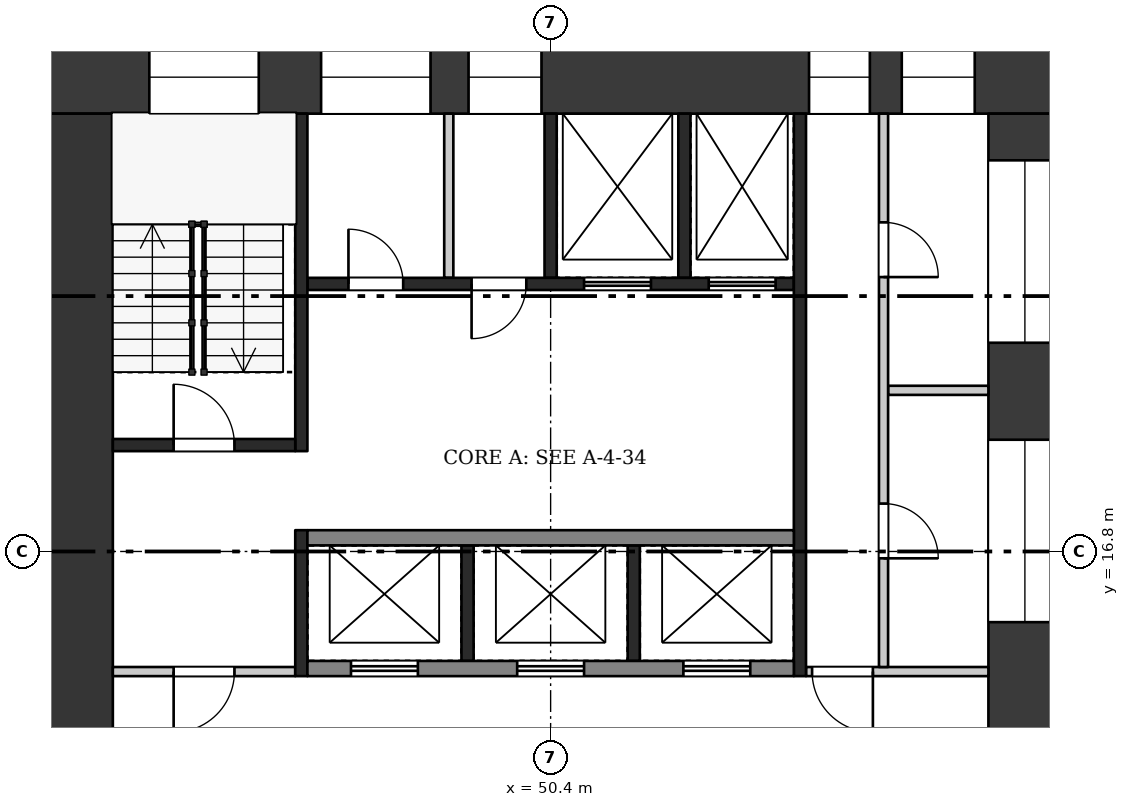
"""IFC4 building model, lengths in metres.
Left out: names, types, materials, properties, quantities, classifications, styles, units other than length and angle.
Written with IfcOpenShell. Run it as: python <this file> out.ifc"""

import sys

from ifc_helpers import new_model, si_unit, direction, frame, frame_2d, origin, place, context, subcontext, project, spatial, rectangle, extrude, element, fill, save


model = new_model("IFC4")
c1 = context("Model", 3, precision=1e-05, world=origin(), true_north=direction((0.0, 1.0)))
c2 = subcontext(c1, "Body", "Model", "MODEL_VIEW")
j1 = project(units=[si_unit("LENGTHUNIT", "METRE"), si_unit("PLANEANGLEUNIT", "RADIAN")], contexts=[c1])
p1 = place(None, origin())
s1 = spatial("IfcSite", under=j1, at=p1, CompositionType="ELEMENT")
p2 = place(p1, origin())
s2 = spatial("IfcBuilding", under=s1, at=p2, CompositionType="ELEMENT")
p3 = place(p2, frame((0.0, 0.0, 256.2)))
s3 = spatial("IfcBuildingStorey", under=s2, at=p3, CompositionType="ELEMENT", Elevation=256.2)
p4 = place(p3, frame((42.0, 24.6, 0.0), z_axis=(0.0, 0.0, 1.0), x_axis=(1.0, 0.0, 0.0)))
e1 = element("IfcWall", 1, at=p4, inside=s3, PredefinedType="SHEAR", context=c2, shape_type="SweptSolid", body=[
    extrude(rectangle(XDim=16.8, YDim=1.2, at=frame_2d((8.4, 0.0))), origin(), (0.0, 0.0, 1.0), 3.22),
])
p5 = place(p4, frame((1.8, 0.0, 0.5)))
e2 = element("IfcOpeningElement", 2, at=p5, cuts=e1, PredefinedType="OPENING", context=c2, shape_type="SweptSolid", body=[
    extrude(rectangle(XDim=1.8, YDim=2.4, at=frame_2d((0.9, 1.2))), frame((0.0, 0.61, 0.0), z_axis=(0.0, -1.0, 0.0), x_axis=(1.0, 0.0, 0.0)), (0.0, 0.0, 1.0), 1.22),
])
p6 = place(p4, frame((4.625, 0.0, 1.6)))
e3 = element("IfcOpeningElement", 3, at=p6, cuts=e1, PredefinedType="OPENING", context=c2, shape_type="SweptSolid", body=[
    extrude(rectangle(XDim=1.8, YDim=1.2, at=frame_2d((0.9, 0.6))), frame((0.0, 0.61, 0.0), z_axis=(0.0, -1.0, 0.0), x_axis=(1.0, 0.0, 0.0)), (0.0, 0.0, 1.0), 1.22),
])
p7 = place(p4, frame((7.05, 0.0, 1.6)))
e4 = element("IfcOpeningElement", 4, at=p7, cuts=e1, PredefinedType="OPENING", context=c2, shape_type="SweptSolid", body=[
    extrude(rectangle(XDim=1.2, YDim=1.2, at=frame_2d((0.6, 0.6))), frame((0.0, 0.61, 0.0), z_axis=(0.0, -1.0, 0.0), x_axis=(1.0, 0.0, 0.0)), (0.0, 0.0, 1.0), 1.22),
])
p8 = place(p4, frame((12.65, 0.0, 0.6)))
e5 = element("IfcOpeningElement", 5, at=p8, cuts=e1, PredefinedType="OPENING", context=c2, shape_type="SweptSolid", body=[
    extrude(rectangle(XDim=1.0, YDim=2.1, at=frame_2d((0.5, 1.05))), frame((0.0, 0.61, 0.0), z_axis=(0.0, -1.0, 0.0), x_axis=(1.0, 0.0, 0.0)), (0.0, 0.0, 1.0), 1.22),
])
p9 = place(p4, frame((14.175, 0.0, 1.6)))
e6 = element("IfcOpeningElement", 6, at=p9, cuts=e1, PredefinedType="OPENING", context=c2, shape_type="SweptSolid", body=[
    extrude(rectangle(XDim=1.2, YDim=1.2, at=frame_2d((0.6, 0.6))), frame((0.0, 0.61, 0.0), z_axis=(0.0, -1.0, 0.0), x_axis=(1.0, 0.0, 0.0)), (0.0, 0.0, 1.0), 1.22),
])
p10 = place(p3, frame((42.6, 9.6, 0.0), z_axis=(0.0, 0.0, 1.0), x_axis=(0.0, 1.0, 0.0)))
e7 = element("IfcWall", 7, at=p10, inside=s3, PredefinedType="SHEAR", context=c2, shape_type="SweptSolid", body=[
    extrude(rectangle(XDim=14.4, YDim=1.2, at=frame_2d((7.2, 0.0))), origin(), (0.0, 0.0, 1.0), 3.22),
])
p11 = place(p10, frame((2.1, 0.0, 0.0)))
e8 = element("IfcOpeningElement", 8, at=p11, cuts=e7, PredefinedType="OPENING", context=c2, shape_type="SweptSolid", body=[
    extrude(rectangle(XDim=1.8, YDim=2.1, at=frame_2d((0.9, 1.05))), frame((0.0, 0.61, 0.0), z_axis=(0.0, -1.0, 0.0), x_axis=(1.0, 0.0, 0.0)), (0.0, 0.0, 1.0), 1.22),
])
p12 = place(p3, frame((58.2, 9.6, 0.0), z_axis=(0.0, 0.0, 1.0), x_axis=(0.0, 1.0, 0.0)))
e9 = element("IfcWall", 9, at=p12, inside=s3, PredefinedType="SHEAR", context=c2, shape_type="SweptSolid", body=[
    extrude(rectangle(XDim=14.4, YDim=1.2, at=frame_2d((7.2, 0.0))), origin(), (0.0, 0.0, 1.0), 3.22),
])
p13 = place(p12, frame((1.105, 0.0, 0.6)))
e10 = element("IfcOpeningElement", 10, at=p13, cuts=e9, PredefinedType="OPENING", context=c2, shape_type="SweptSolid", body=[
    extrude(rectangle(XDim=3.0, YDim=2.1, at=frame_2d((1.5, 1.05))), frame((0.0, 0.61, 0.0), z_axis=(0.0, -1.0, 0.0), x_axis=(1.0, 0.0, 0.0)), (0.0, 0.0, 1.0), 1.22),
])
p14 = place(p12, frame((6.038, 0.0, 1.6)))
e11 = element("IfcOpeningElement", 11, at=p14, cuts=e9, PredefinedType="OPENING", context=c2, shape_type="SweptSolid", body=[
    extrude(rectangle(XDim=3.0, YDim=1.2, at=frame_2d((1.5, 0.6))), frame((0.0, 0.61, 0.0), z_axis=(0.0, -1.0, 0.0), x_axis=(1.0, 0.0, 0.0)), (0.0, 0.0, 1.0), 1.22),
])
p15 = place(p12, frame((10.633, 0.0, 1.6)))
e12 = element("IfcOpeningElement", 12, at=p15, cuts=e9, PredefinedType="OPENING", context=c2, shape_type="SweptSolid", body=[
    extrude(rectangle(XDim=3.0, YDim=1.2, at=frame_2d((1.5, 0.6))), frame((0.0, 0.61, 0.0), z_axis=(0.0, -1.0, 0.0), x_axis=(1.0, 0.0, 0.0)), (0.0, 0.0, 1.0), 1.22),
])
for number, where, z_axis, x_axis in (
    (13, (49.033, 15.0, 0.0), (0.0, 0.0, 1.0), (0.0, 1.0, 0.0)),
    (14, (51.767, 15.0, 0.0), (0.0, 0.0, 1.0), (0.0, 1.0, 0.0)),
):
    element("IfcWall", number, at=place(p3, frame(where, z_axis=z_axis, x_axis=x_axis)), inside=s3, PredefinedType="SHEAR", context=c2, shape_type="SweptSolid", body=[
        extrude(rectangle(XDim=1.9, YDim=0.2, at=frame_2d((0.95, 0.0))), origin(), (0.0, 0.0, 1.0), 3.22),
    ])
p16 = place(p3, frame((46.4, 14.875, 0.0), z_axis=(0.0, 0.0, 1.0), x_axis=(1.0, 0.0, 0.0)))
e15 = element("IfcWall", 15, at=p16, inside=s3, PredefinedType="SHEAR", context=c2, shape_type="SweptSolid", body=[
    extrude(rectangle(XDim=8.0, YDim=0.25, at=frame_2d((4.0, 0.0))), origin(), (0.0, 0.0, 1.0), 3.22),
])
p17 = place(p16, frame((0.717, 0.0, 0.0)))
e16 = element("IfcOpeningElement", 16, at=p17, cuts=e15, PredefinedType="OPENING", context=c2, shape_type="SweptSolid", body=[
    extrude(rectangle(XDim=1.1, YDim=2.1, at=frame_2d((0.55, 1.05))), frame((0.0, 0.135, 0.0), z_axis=(0.0, -1.0, 0.0), x_axis=(1.0, 0.0, 0.0)), (0.0, 0.0, 1.0), 0.27),
])
p18 = place(p16, frame((3.45, 0.0, 0.0)))
e17 = element("IfcOpeningElement", 17, at=p18, cuts=e15, PredefinedType="OPENING", context=c2, shape_type="SweptSolid", body=[
    extrude(rectangle(XDim=1.1, YDim=2.1, at=frame_2d((0.55, 1.05))), frame((0.0, 0.135, 0.0), z_axis=(0.0, -1.0, 0.0), x_axis=(1.0, 0.0, 0.0)), (0.0, 0.0, 1.0), 0.27),
])
p19 = place(p16, frame((6.183, 0.0, 0.0)))
e18 = element("IfcOpeningElement", 18, at=p19, cuts=e15, PredefinedType="OPENING", context=c2, shape_type="SweptSolid", body=[
    extrude(rectangle(XDim=1.1, YDim=2.1, at=frame_2d((0.55, 1.05))), frame((0.0, 0.135, 0.0), z_axis=(0.0, -1.0, 0.0), x_axis=(1.0, 0.0, 0.0)), (0.0, 0.0, 1.0), 0.27),
])
p20 = place(p3, frame((46.4, 17.025, 0.0), z_axis=(0.0, 0.0, 1.0), x_axis=(1.0, 0.0, 0.0)))
e19 = element("IfcWall", 19, at=p20, inside=s3, PredefinedType="SHEAR", context=c2, shape_type="SweptSolid", body=[
    extrude(rectangle(XDim=8.0, YDim=0.25, at=frame_2d((4.0, 0.0))), origin(), (0.0, 0.0, 1.0), 3.22),
])
for number, where, z_axis, x_axis in (
    (20, (50.4, 21.3, 0.0), (0.0, 0.0, 1.0), (0.0, 1.0, 0.0)),
    (21, (52.6, 21.3, 0.0), (0.0, 0.0, 1.0), (0.0, 1.0, 0.0)),
):
    element("IfcWall", number, at=place(p3, frame(where, z_axis=z_axis, x_axis=x_axis)), inside=s3, PredefinedType="SHEAR", context=c2, shape_type="SweptSolid", body=[
        extrude(rectangle(XDim=2.7, YDim=0.2, at=frame_2d((1.35, 0.0))), origin(), (0.0, 0.0, 1.0), 3.22),
    ])
p21 = place(p3, frame((48.725, 21.3, 0.0), z_axis=(0.0, 0.0, 1.0), x_axis=(0.0, 1.0, 0.0)))
e22 = element("IfcWall", 22, at=p21, inside=s3, PredefinedType="PARTITIONING", context=c2, shape_type="SweptSolid", body=[
    extrude(rectangle(XDim=2.7, YDim=0.15, at=frame_2d((1.35, 0.0))), origin(), (0.0, 0.0, 1.0), 3.22),
])
p22 = place(p3, frame((46.4, 21.2, 0.0), z_axis=(0.0, 0.0, 1.0), x_axis=(1.0, 0.0, 0.0)))
e23 = element("IfcWall", 23, at=p22, inside=s3, PredefinedType="SHEAR", context=c2, shape_type="SweptSolid", body=[
    extrude(rectangle(XDim=8.0, YDim=0.2, at=frame_2d((4.0, 0.0))), origin(), (0.0, 0.0, 1.0), 3.22),
])
p23 = place(p22, frame((0.675, 0.0, 0.0)))
e24 = element("IfcOpeningElement", 24, at=p23, cuts=e23, PredefinedType="OPENING", context=c2, shape_type="SweptSolid", body=[
    extrude(rectangle(XDim=0.9, YDim=2.1, at=frame_2d((0.45, 1.05))), frame((0.0, 0.11, 0.0), z_axis=(0.0, -1.0, 0.0), x_axis=(1.0, 0.0, 0.0)), (0.0, 0.0, 1.0), 0.22),
])
p24 = place(p22, frame((2.7, 0.0, 0.0)))
e25 = element("IfcOpeningElement", 25, at=p24, cuts=e23, PredefinedType="OPENING", context=c2, shape_type="SweptSolid", body=[
    extrude(rectangle(XDim=0.9, YDim=2.1, at=frame_2d((0.45, 1.05))), frame((0.0, 0.11, 0.0), z_axis=(0.0, -1.0, 0.0), x_axis=(1.0, 0.0, 0.0)), (0.0, 0.0, 1.0), 0.22),
])
p25 = place(p22, frame((4.55, 0.0, 0.0)))
e26 = element("IfcOpeningElement", 26, at=p25, cuts=e23, PredefinedType="OPENING", context=c2, shape_type="SweptSolid", body=[
    extrude(rectangle(XDim=1.1, YDim=2.1, at=frame_2d((0.55, 1.05))), frame((0.0, 0.11, 0.0), z_axis=(0.0, -1.0, 0.0), x_axis=(1.0, 0.0, 0.0)), (0.0, 0.0, 1.0), 0.22),
])
p26 = place(p22, frame((6.6, 0.0, 0.0)))
e27 = element("IfcOpeningElement", 27, at=p26, cuts=e23, PredefinedType="OPENING", context=c2, shape_type="SweptSolid", body=[
    extrude(rectangle(XDim=1.1, YDim=2.1, at=frame_2d((0.55, 1.05))), frame((0.0, 0.11, 0.0), z_axis=(0.0, -1.0, 0.0), x_axis=(1.0, 0.0, 0.0)), (0.0, 0.0, 1.0), 0.22),
])
p27 = place(p3, frame((46.3, 14.75, 0.0), z_axis=(0.0, 0.0, 1.0), x_axis=(0.0, 1.0, 0.0)))
e28 = element("IfcWall", 28, at=p27, inside=s3, PredefinedType="SHEAR", context=c2, shape_type="SweptSolid", body=[
    extrude(rectangle(XDim=2.4, YDim=0.2, at=frame_2d((1.2, 0.0))), origin(), (0.0, 0.0, 1.0), 3.22),
])
p28 = place(p3, frame((46.3, 18.45, 0.0), z_axis=(0.0, 0.0, 1.0), x_axis=(0.0, 1.0, 0.0)))
e29 = element("IfcWall", 29, at=p28, inside=s3, PredefinedType="SHEAR", context=c2, shape_type="SweptSolid", body=[
    extrude(rectangle(XDim=5.55, YDim=0.2, at=frame_2d((2.775, 0.0))), origin(), (0.0, 0.0, 1.0), 3.22),
])
p29 = place(p3, frame((43.2, 14.825, 0.0), z_axis=(0.0, 0.0, 1.0), x_axis=(1.0, 0.0, 0.0)))
e30 = element("IfcWall", 30, at=p29, inside=s3, PredefinedType="PARTITIONING", context=c2, shape_type="SweptSolid", body=[
    extrude(rectangle(XDim=3.0, YDim=0.15, at=frame_2d((1.5, 0.0))), origin(), (0.0, 0.0, 1.0), 3.22),
])
p30 = place(p29, frame((1.0, 0.0, 0.0)))
e31 = element("IfcOpeningElement", 31, at=p30, cuts=e30, PredefinedType="OPENING", context=c2, shape_type="SweptSolid", body=[
    extrude(rectangle(XDim=1.0, YDim=2.1, at=frame_2d((0.5, 1.05))), frame((0.0, 0.085, 0.0), z_axis=(0.0, -1.0, 0.0), x_axis=(1.0, 0.0, 0.0)), (0.0, 0.0, 1.0), 0.17),
])
p31 = place(p3, frame((43.2, 18.55, 0.0), z_axis=(0.0, 0.0, 1.0), x_axis=(1.0, 0.0, 0.0)))
e32 = element("IfcWall", 32, at=p31, inside=s3, PredefinedType="SHEAR", context=c2, shape_type="SweptSolid", body=[
    extrude(rectangle(XDim=3.0, YDim=0.2, at=frame_2d((1.5, 0.0))), origin(), (0.0, 0.0, 1.0), 3.22),
])
p32 = place(p31, frame((1.0, 0.0, 0.0)))
e33 = element("IfcOpeningElement", 33, at=p32, cuts=e32, PredefinedType="OPENING", context=c2, shape_type="SweptSolid", body=[
    extrude(rectangle(XDim=1.0, YDim=2.1, at=frame_2d((0.5, 1.05))), frame((0.0, 0.11, 0.0), z_axis=(0.0, -1.0, 0.0), x_axis=(1.0, 0.0, 0.0)), (0.0, 0.0, 1.0), 0.22),
])
p33 = place(p3, frame((54.5, 14.75, 0.0), z_axis=(0.0, 0.0, 1.0), x_axis=(0.0, 1.0, 0.0)))
e34 = element("IfcWall", 34, at=p33, inside=s3, PredefinedType="SHEAR", context=c2, shape_type="SweptSolid", body=[
    extrude(rectangle(XDim=9.25, YDim=0.2, at=frame_2d((4.625, 0.0))), origin(), (0.0, 0.0, 1.0), 3.22),
])
p34 = place(p3, frame((54.6, 14.825, 0.0), z_axis=(0.0, 0.0, 1.0), x_axis=(1.0, 0.0, 0.0)))
e35 = element("IfcWall", 35, at=p34, inside=s3, PredefinedType="PARTITIONING", context=c2, shape_type="SweptSolid", body=[
    extrude(rectangle(XDim=3.0, YDim=0.15, at=frame_2d((1.5, 0.0))), origin(), (0.0, 0.0, 1.0), 3.22),
])
p35 = place(p34, frame((0.1, 0.0, 0.0)))
e36 = element("IfcOpeningElement", 36, at=p35, cuts=e35, PredefinedType="OPENING", context=c2, shape_type="SweptSolid", body=[
    extrude(rectangle(XDim=1.0, YDim=2.1, at=frame_2d((0.5, 1.05))), frame((0.0, 0.085, 0.0), z_axis=(0.0, -1.0, 0.0), x_axis=(1.0, 0.0, 0.0)), (0.0, 0.0, 1.0), 0.17),
])
p36 = place(p3, frame((55.95, 19.45, 0.0), z_axis=(0.0, 0.0, 1.0), x_axis=(1.0, 0.0, 0.0)))
e37 = element("IfcWall", 37, at=p36, inside=s3, PredefinedType="PARTITIONING", context=c2, shape_type="SweptSolid", body=[
    extrude(rectangle(XDim=1.65, YDim=0.15, at=frame_2d((0.825, 0.0))), origin(), (0.0, 0.0, 1.0), 3.22),
])
p37 = place(p3, frame((55.875, 14.9, 0.0), z_axis=(0.0, 0.0, 1.0), x_axis=(0.0, 1.0, 0.0)))
e38 = element("IfcWall", 38, at=p37, inside=s3, PredefinedType="PARTITIONING", context=c2, shape_type="SweptSolid", body=[
    extrude(rectangle(XDim=9.1, YDim=0.15, at=frame_2d((4.55, 0.0))), origin(), (0.0, 0.0, 1.0), 3.22),
])
p38 = place(p37, frame((1.788, 0.0, 0.0)))
e39 = element("IfcOpeningElement", 39, at=p38, cuts=e38, PredefinedType="OPENING", context=c2, shape_type="SweptSolid", body=[
    extrude(rectangle(XDim=0.9, YDim=2.1, at=frame_2d((0.45, 1.05))), frame((0.0, 0.085, 0.0), z_axis=(0.0, -1.0, 0.0), x_axis=(1.0, 0.0, 0.0)), (0.0, 0.0, 1.0), 0.17),
])
p39 = place(p37, frame((6.413, 0.0, 0.0)))
e40 = element("IfcOpeningElement", 40, at=p39, cuts=e38, PredefinedType="OPENING", context=c2, shape_type="SweptSolid", body=[
    extrude(rectangle(XDim=0.9, YDim=2.1, at=frame_2d((0.45, 1.05))), frame((0.0, 0.085, 0.0), z_axis=(0.0, -1.0, 0.0), x_axis=(1.0, 0.0, 0.0)), (0.0, 0.0, 1.0), 0.17),
])
p40 = place(p17, origin())
e41 = element("IfcDoor", 41, at=p40, inside=s3, OperationType="DOUBLE_DOOR_SLIDING", PredefinedType="DOOR", context=c2, shape_type="SweptSolid", body=[
    extrude(rectangle(XDim=1.1, YDim=2.1, at=frame_2d((0.55, 1.05))), frame((0.0, 0.025, 0.0), z_axis=(0.0, -1.0, 0.0), x_axis=(1.0, 0.0, 0.0)), (0.0, 0.0, 1.0), 0.05),
])
fill(e16, e41)
p41 = place(p18, origin())
e42 = element("IfcDoor", 42, at=p41, inside=s3, OperationType="DOUBLE_DOOR_SLIDING", PredefinedType="DOOR", context=c2, shape_type="SweptSolid", body=[
    extrude(rectangle(XDim=1.1, YDim=2.1, at=frame_2d((0.55, 1.05))), frame((0.0, 0.025, 0.0), z_axis=(0.0, -1.0, 0.0), x_axis=(1.0, 0.0, 0.0)), (0.0, 0.0, 1.0), 0.05),
])
fill(e17, e42)
p42 = place(p19, origin())
e43 = element("IfcDoor", 43, at=p42, inside=s3, OperationType="DOUBLE_DOOR_SLIDING", PredefinedType="DOOR", context=c2, shape_type="SweptSolid", body=[
    extrude(rectangle(XDim=1.1, YDim=2.1, at=frame_2d((0.55, 1.05))), frame((0.0, 0.025, 0.0), z_axis=(0.0, -1.0, 0.0), x_axis=(1.0, 0.0, 0.0)), (0.0, 0.0, 1.0), 0.05),
])
fill(e18, e43)
p43 = place(p23, origin())
e44 = element("IfcDoor", 44, at=p43, inside=s3, OperationType="SINGLE_SWING_LEFT", PredefinedType="DOOR", context=c2, shape_type="SweptSolid", body=[
    extrude(rectangle(XDim=0.9, YDim=2.1, at=frame_2d((0.45, 1.05))), frame((0.0, 0.025, 0.0), z_axis=(0.0, -1.0, 0.0), x_axis=(1.0, 0.0, 0.0)), (0.0, 0.0, 1.0), 0.05),
])
fill(e24, e44)
p44 = place(p24, frame((0.9, 0.0, 0.0), z_axis=(0.0, 0.0, 1.0), x_axis=(-1.0, 0.0, 0.0)))
e45 = element("IfcDoor", 45, at=p44, inside=s3, OperationType="SINGLE_SWING_RIGHT", PredefinedType="DOOR", context=c2, shape_type="SweptSolid", body=[
    extrude(rectangle(XDim=0.9, YDim=2.1, at=frame_2d((0.45, 1.05))), frame((0.0, 0.025, 0.0), z_axis=(0.0, -1.0, 0.0), x_axis=(1.0, 0.0, 0.0)), (0.0, 0.0, 1.0), 0.05),
])
fill(e25, e45)
p45 = place(p25, origin())
e46 = element("IfcDoor", 46, at=p45, inside=s3, OperationType="DOUBLE_DOOR_SLIDING", PredefinedType="DOOR", context=c2, shape_type="SweptSolid", body=[
    extrude(rectangle(XDim=1.1, YDim=2.1, at=frame_2d((0.55, 1.05))), frame((0.0, 0.025, 0.0), z_axis=(0.0, -1.0, 0.0), x_axis=(1.0, 0.0, 0.0)), (0.0, 0.0, 1.0), 0.05),
])
fill(e26, e46)
p46 = place(p26, origin())
e47 = element("IfcDoor", 47, at=p46, inside=s3, OperationType="DOUBLE_DOOR_SLIDING", PredefinedType="DOOR", context=c2, shape_type="SweptSolid", body=[
    extrude(rectangle(XDim=1.1, YDim=2.1, at=frame_2d((0.55, 1.05))), frame((0.0, 0.025, 0.0), z_axis=(0.0, -1.0, 0.0), x_axis=(1.0, 0.0, 0.0)), (0.0, 0.0, 1.0), 0.05),
])
fill(e27, e47)
p47 = place(p30, frame((1.0, 0.0, 0.0), z_axis=(0.0, 0.0, 1.0), x_axis=(-1.0, 0.0, 0.0)))
e48 = element("IfcDoor", 48, at=p47, inside=s3, OperationType="SINGLE_SWING_RIGHT", PredefinedType="DOOR", context=c2, shape_type="SweptSolid", body=[
    extrude(rectangle(XDim=1.0, YDim=2.1, at=frame_2d((0.5, 1.05))), frame((0.0, 0.025, 0.0), z_axis=(0.0, -1.0, 0.0), x_axis=(1.0, 0.0, 0.0)), (0.0, 0.0, 1.0), 0.05),
])
fill(e31, e48)
p48 = place(p32, origin())
e49 = element("IfcDoor", 49, at=p48, inside=s3, OperationType="SINGLE_SWING_LEFT", PredefinedType="DOOR", context=c2, shape_type="SweptSolid", body=[
    extrude(rectangle(XDim=1.0, YDim=2.1, at=frame_2d((0.5, 1.05))), frame((0.0, 0.025, 0.0), z_axis=(0.0, -1.0, 0.0), x_axis=(1.0, 0.0, 0.0)), (0.0, 0.0, 1.0), 0.05),
])
fill(e33, e49)
p49 = place(p35, frame((1.0, 0.0, 0.0), z_axis=(0.0, 0.0, 1.0), x_axis=(-1.0, 0.0, 0.0)))
e50 = element("IfcDoor", 50, at=p49, inside=s3, OperationType="SINGLE_SWING_LEFT", PredefinedType="DOOR", context=c2, shape_type="SweptSolid", body=[
    extrude(rectangle(XDim=1.0, YDim=2.1, at=frame_2d((0.5, 1.05))), frame((0.0, 0.025, 0.0), z_axis=(0.0, -1.0, 0.0), x_axis=(1.0, 0.0, 0.0)), (0.0, 0.0, 1.0), 0.05),
])
fill(e36, e50)
p50 = place(p38, frame((0.9, 0.0, 0.0), z_axis=(0.0, 0.0, 1.0), x_axis=(-1.0, 0.0, 0.0)))
e51 = element("IfcDoor", 51, at=p50, inside=s3, OperationType="SINGLE_SWING_RIGHT", PredefinedType="DOOR", context=c2, shape_type="SweptSolid", body=[
    extrude(rectangle(XDim=0.9, YDim=2.1, at=frame_2d((0.45, 1.05))), frame((0.0, 0.025, 0.0), z_axis=(0.0, -1.0, 0.0), x_axis=(1.0, 0.0, 0.0)), (0.0, 0.0, 1.0), 0.05),
])
fill(e39, e51)
p51 = place(p39, frame((0.9, 0.0, 0.0), z_axis=(0.0, 0.0, 1.0), x_axis=(-1.0, 0.0, 0.0)))
e52 = element("IfcDoor", 52, at=p51, inside=s3, OperationType="SINGLE_SWING_RIGHT", PredefinedType="DOOR", context=c2, shape_type="SweptSolid", body=[
    extrude(rectangle(XDim=0.9, YDim=2.1, at=frame_2d((0.45, 1.05))), frame((0.0, 0.025, 0.0), z_axis=(0.0, -1.0, 0.0), x_axis=(1.0, 0.0, 0.0)), (0.0, 0.0, 1.0), 0.05),
])
fill(e40, e52)
p52 = place(p5, origin())
e53 = element("IfcWindow", 53, at=p52, inside=s3, PartitioningType="SINGLE_PANEL", PredefinedType="WINDOW", context=c2, shape_type="SweptSolid", body=[
    extrude(rectangle(XDim=1.8, YDim=2.4, at=frame_2d((0.9, 1.2))), frame((0.0, 0.03, 0.0), z_axis=(0.0, -1.0, 0.0), x_axis=(1.0, 0.0, 0.0)), (0.0, 0.0, 1.0), 0.06),
])
fill(e2, e53)
p53 = place(p6, origin())
e54 = element("IfcWindow", 54, at=p53, inside=s3, PartitioningType="SINGLE_PANEL", PredefinedType="WINDOW", context=c2, shape_type="SweptSolid", body=[
    extrude(rectangle(XDim=1.8, YDim=1.2, at=frame_2d((0.9, 0.6))), frame((0.0, 0.03, 0.0), z_axis=(0.0, -1.0, 0.0), x_axis=(1.0, 0.0, 0.0)), (0.0, 0.0, 1.0), 0.06),
])
fill(e3, e54)
p54 = place(p7, origin())
e55 = element("IfcWindow", 55, at=p54, inside=s3, PartitioningType="SINGLE_PANEL", PredefinedType="WINDOW", context=c2, shape_type="SweptSolid", body=[
    extrude(rectangle(XDim=1.2, YDim=1.2, at=frame_2d((0.6, 0.6))), frame((0.0, 0.03, 0.0), z_axis=(0.0, -1.0, 0.0), x_axis=(1.0, 0.0, 0.0)), (0.0, 0.0, 1.0), 0.06),
])
fill(e4, e55)
p55 = place(p8, origin())
e56 = element("IfcWindow", 56, at=p55, inside=s3, PartitioningType="SINGLE_PANEL", PredefinedType="WINDOW", context=c2, shape_type="SweptSolid", body=[
    extrude(rectangle(XDim=1.0, YDim=2.1, at=frame_2d((0.5, 1.05))), frame((0.0, 0.03, 0.0), z_axis=(0.0, -1.0, 0.0), x_axis=(1.0, 0.0, 0.0)), (0.0, 0.0, 1.0), 0.06),
])
fill(e5, e56)
p56 = place(p9, origin())
e57 = element("IfcWindow", 57, at=p56, inside=s3, PartitioningType="SINGLE_PANEL", PredefinedType="WINDOW", context=c2, shape_type="SweptSolid", body=[
    extrude(rectangle(XDim=1.2, YDim=1.2, at=frame_2d((0.6, 0.6))), frame((0.0, 0.03, 0.0), z_axis=(0.0, -1.0, 0.0), x_axis=(1.0, 0.0, 0.0)), (0.0, 0.0, 1.0), 0.06),
])
fill(e6, e57)
p57 = place(p14, origin())
e58 = element("IfcWindow", 58, at=p57, inside=s3, PartitioningType="SINGLE_PANEL", PredefinedType="WINDOW", context=c2, shape_type="SweptSolid", body=[
    extrude(rectangle(XDim=3.0, YDim=1.2, at=frame_2d((1.5, 0.6))), frame((0.0, 0.03, 0.0), z_axis=(0.0, -1.0, 0.0), x_axis=(1.0, 0.0, 0.0)), (0.0, 0.0, 1.0), 0.06),
])
fill(e11, e58)
p58 = place(p15, origin())
e59 = element("IfcWindow", 59, at=p58, inside=s3, PartitioningType="SINGLE_PANEL", PredefinedType="WINDOW", context=c2, shape_type="SweptSolid", body=[
    extrude(rectangle(XDim=3.0, YDim=1.2, at=frame_2d((1.5, 0.6))), frame((0.0, 0.03, 0.0), z_axis=(0.0, -1.0, 0.0), x_axis=(1.0, 0.0, 0.0)), (0.0, 0.0, 1.0), 0.06),
])
fill(e12, e59)
save(model, sys.argv[1])
